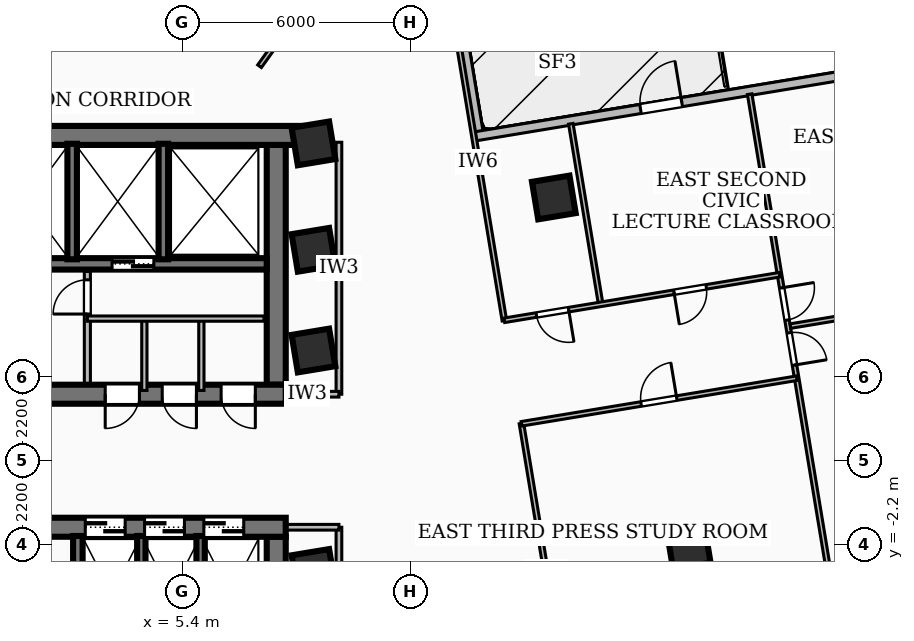
"""IFC4 building model, lengths in metres.
Left out: names, types, materials, properties, quantities, classifications, styles, units other than length and angle.
Written with IfcOpenShell. Run it as: python <this file> out.ifc"""

import sys

from ifc_helpers import new_model, si_unit, direction, frame, frame_2d, origin, origin_2d, place, context, subcontext, project, spatial, rectangle, extrude, element, fill, save


model = new_model("IFC4")
c1 = context("Model", 3, precision=1e-05, world=origin(), true_north=direction((0.0, 1.0)))
c2 = subcontext(c1, "Body", "Model", "MODEL_VIEW")
j1 = project(units=[si_unit("LENGTHUNIT", "METRE"), si_unit("PLANEANGLEUNIT", "RADIAN")], contexts=[c1])
p1 = place(None, origin())
s1 = spatial("IfcSite", under=j1, at=p1, CompositionType="ELEMENT")
p2 = place(p1, origin())
s2 = spatial("IfcBuilding", under=s1, at=p2, CompositionType="ELEMENT")
p3 = place(p2, frame((0.0, 0.0, 96.48)))
s3 = spatial("IfcBuildingStorey", under=s2, at=p3, CompositionType="ELEMENT", Elevation=96.48)
p4 = place(p3, frame((-8.78, 8.56, 0.0), z_axis=(0.0, 0.0, 1.0), x_axis=(1.0, 0.0, 0.0)))
e1 = element("IfcWall", 1, at=p4, inside=s3, PredefinedType="SHEAR", context=c2, shape_type="SweptSolid", body=[
    extrude(rectangle(XDim=17.56, YDim=0.5, at=frame_2d((8.78, 0.0))), origin(), (0.0, 0.0, 1.0), 3.34),
])
p5 = place(p3, frame((8.12, 1.75, 0.0), z_axis=(0.0, 0.0, 1.0), x_axis=(-1.0, 0.0, 0.0)))
e2 = element("IfcWall", 2, at=p5, inside=s3, PredefinedType="SHEAR", context=c2, shape_type="SweptSolid", body=[
    extrude(rectangle(XDim=16.24, YDim=0.5, at=frame_2d((8.12, 0.0))), origin(), (0.0, 0.0, 1.0), 3.34),
])
p6 = place(p5, frame((7.45, 0.0, 0.0)))
e3 = element("IfcOpeningElement", 3, at=p6, cuts=e2, PredefinedType="OPENING", context=c2, shape_type="SweptSolid", body=[
    extrude(rectangle(XDim=1.0, YDim=2.1, at=frame_2d((0.5, 1.05))), frame((0.0, 0.26, 0.0), z_axis=(0.0, -1.0, 0.0), x_axis=(1.0, 0.0, 0.0)), (0.0, 0.0, 1.0), 0.52),
])
p7 = place(p5, frame((3.85, 0.0, 0.0)))
e4 = element("IfcOpeningElement", 4, at=p7, cuts=e2, PredefinedType="OPENING", context=c2, shape_type="SweptSolid", body=[
    extrude(rectangle(XDim=0.9, YDim=2.06, at=frame_2d((0.45, 1.03))), frame((0.0, 0.26, 0.0), z_axis=(0.0, -1.0, 0.0), x_axis=(1.0, 0.0, 0.0)), (0.0, 0.0, 1.0), 0.52),
])
p8 = place(p5, frame((2.35, 0.0, 0.0)))
e5 = element("IfcOpeningElement", 5, at=p8, cuts=e2, PredefinedType="OPENING", context=c2, shape_type="SweptSolid", body=[
    extrude(rectangle(XDim=0.9, YDim=2.06, at=frame_2d((0.45, 1.03))), frame((0.0, 0.26, 0.0), z_axis=(0.0, -1.0, 0.0), x_axis=(1.0, 0.0, 0.0)), (0.0, 0.0, 1.0), 0.52),
])
p9 = place(p5, frame((0.8, 0.0, 0.0)))
e6 = element("IfcOpeningElement", 6, at=p9, cuts=e2, PredefinedType="OPENING", context=c2, shape_type="SweptSolid", body=[
    extrude(rectangle(XDim=0.9, YDim=2.06, at=frame_2d((0.45, 1.03))), frame((0.0, 0.26, 0.0), z_axis=(0.0, -1.0, 0.0), x_axis=(1.0, 0.0, 0.0)), (0.0, 0.0, 1.0), 0.52),
])
p10 = place(p3, frame((7.87, 8.31, 0.0), z_axis=(0.0, 0.0, 1.0), x_axis=(0.0, -1.0, 0.0)))
e7 = element("IfcWall", 7, at=p10, inside=s3, PredefinedType="SHEAR", context=c2, shape_type="SweptSolid", body=[
    extrude(rectangle(XDim=6.31, YDim=0.5, at=frame_2d((3.155, 0.0))), origin(), (0.0, 0.0, 1.0), 3.34),
])
p11 = place(p3, frame((7.62, 5.18, 0.0), z_axis=(0.0, 0.0, 1.0), x_axis=(-1.0, 0.0, 0.0)))
e8 = element("IfcWall", 8, at=p11, inside=s3, PredefinedType="SOLIDWALL", context=c2, shape_type="SweptSolid", body=[
    extrude(rectangle(XDim=15.24, YDim=0.3, at=frame_2d((7.62, 0.0))), origin(), (0.0, 0.0, 1.0), 3.34),
])
p12 = place(p11, frame((5.77, 0.0, 0.0)))
e9 = element("IfcOpeningElement", 9, at=p12, cuts=e8, PredefinedType="OPENING", context=c2, shape_type="SweptSolid", body=[
    extrude(rectangle(XDim=1.1, YDim=2.15, at=frame_2d((0.55, 1.075))), frame((0.0, 0.16, 0.0), z_axis=(0.0, -1.0, 0.0), x_axis=(1.0, 0.0, 0.0)), (0.0, 0.0, 1.0), 0.32),
])
p13 = place(p11, frame((2.97, 0.0, 0.0)))
e10 = element("IfcOpeningElement", 10, at=p13, cuts=e8, PredefinedType="OPENING", context=c2, shape_type="SweptSolid", body=[
    extrude(rectangle(XDim=1.1, YDim=2.15, at=frame_2d((0.55, 1.075))), frame((0.0, 0.16, 0.0), z_axis=(0.0, -1.0, 0.0), x_axis=(1.0, 0.0, 0.0)), (0.0, 0.0, 1.0), 0.32),
])
p14 = place(p11, frame((7.97, 0.0, 0.0)))
e11 = element("IfcOpeningElement", 11, at=p14, cuts=e8, PredefinedType="OPENING", context=c2, shape_type="SweptSolid", body=[
    extrude(rectangle(XDim=1.0, YDim=2.1, at=frame_2d((0.5, 1.05))), frame((0.0, 0.16, 0.0), z_axis=(0.0, -1.0, 0.0), x_axis=(1.0, 0.0, 0.0)), (0.0, 0.0, 1.0), 0.32),
])
p15 = place(p3, frame((-8.12, -1.75, 0.0), z_axis=(0.0, 0.0, 1.0), x_axis=(1.0, 0.0, 0.0)))
e12 = element("IfcWall", 12, at=p15, inside=s3, PredefinedType="SHEAR", context=c2, shape_type="SweptSolid", body=[
    extrude(rectangle(XDim=16.24, YDim=0.5, at=frame_2d((8.12, 0.0))), origin(), (0.0, 0.0, 1.0), 3.34),
])
p16 = place(p15, frame((7.45, 0.0, 0.0)))
e13 = element("IfcOpeningElement", 13, at=p16, cuts=e12, PredefinedType="OPENING", context=c2, shape_type="SweptSolid", body=[
    extrude(rectangle(XDim=1.0, YDim=2.1, at=frame_2d((0.5, 1.05))), frame((0.0, 0.26, 0.0), z_axis=(0.0, -1.0, 0.0), x_axis=(1.0, 0.0, 0.0)), (0.0, 0.0, 1.0), 0.52),
])
p17 = place(p15, frame((10.965, 0.0, 0.0)))
e14 = element("IfcOpeningElement", 14, at=p17, cuts=e12, PredefinedType="OPENING", context=c2, shape_type="SweptSolid", body=[
    extrude(rectangle(XDim=1.05, YDim=2.15, at=frame_2d((0.525, 1.075))), frame((0.0, 0.26, 0.0), z_axis=(0.0, -1.0, 0.0), x_axis=(1.0, 0.0, 0.0)), (0.0, 0.0, 1.0), 0.52),
])
p18 = place(p15, frame((12.525, 0.0, 0.0)))
e15 = element("IfcOpeningElement", 15, at=p18, cuts=e12, PredefinedType="OPENING", context=c2, shape_type="SweptSolid", body=[
    extrude(rectangle(XDim=1.05, YDim=2.15, at=frame_2d((0.525, 1.075))), frame((0.0, 0.26, 0.0), z_axis=(0.0, -1.0, 0.0), x_axis=(1.0, 0.0, 0.0)), (0.0, 0.0, 1.0), 0.52),
])
p19 = place(p15, frame((14.085, 0.0, 0.0)))
e16 = element("IfcOpeningElement", 16, at=p19, cuts=e12, PredefinedType="OPENING", context=c2, shape_type="SweptSolid", body=[
    extrude(rectangle(XDim=1.05, YDim=2.15, at=frame_2d((0.525, 1.075))), frame((0.0, 0.26, 0.0), z_axis=(0.0, -1.0, 0.0), x_axis=(1.0, 0.0, 0.0)), (0.0, 0.0, 1.0), 0.52),
])
p20 = place(p3, frame((7.87, -2.0, 0.0), z_axis=(0.0, 0.0, 1.0), x_axis=(0.0, -1.0, 0.0)))
e17 = element("IfcWall", 17, at=p20, inside=s3, PredefinedType="SHEAR", context=c2, shape_type="SweptSolid", body=[
    extrude(rectangle(XDim=6.31, YDim=0.5, at=frame_2d((3.155, 0.0))), origin(), (0.0, 0.0, 1.0), 3.34),
])
for number, where, z_axis, x_axis in (
    (18, (2.5, 5.3, 0.0), (0.0, 0.0, 1.0), (0.0, 1.0, 0.0)),
    (19, (4.9, 5.3, 0.0), (0.0, 0.0, 1.0), (0.0, 1.0, 0.0)),
):
    element("IfcWall", number, at=place(p3, frame(where, z_axis=z_axis, x_axis=x_axis)), inside=s3, PredefinedType="SOLIDWALL", context=c2, shape_type="SweptSolid", body=[
        extrude(rectangle(XDim=3.04, YDim=0.25, at=frame_2d((1.52, 0.0))), origin(), (0.0, 0.0, 1.0), 3.34),
    ])
p21 = place(p3, frame((2.65, -5.05, 0.0), z_axis=(0.0, 0.0, 1.0), x_axis=(0.0, 1.0, 0.0)))
e20 = element("IfcWall", 20, at=p21, inside=s3, PredefinedType="SOLIDWALL", context=c2, shape_type="SweptSolid", body=[
    extrude(rectangle(XDim=3.07, YDim=0.25, at=frame_2d((1.535, 0.0))), origin(), (0.0, 0.0, 1.0), 3.34),
])
for number, where, z_axis, x_axis in (
    (21, (4.32, -5.05, 0.0), (0.0, 0.0, 1.0), (0.0, 1.0, 0.0)),
    (22, (5.88, -5.05, 0.0), (0.0, 0.0, 1.0), (0.0, 1.0, 0.0)),
):
    element("IfcWall", number, at=place(p3, frame(where, z_axis=z_axis, x_axis=x_axis)), inside=s3, PredefinedType="SOLIDWALL", context=c2, shape_type="SweptSolid", body=[
        extrude(rectangle(XDim=3.07, YDim=0.22, at=frame_2d((1.535, 0.0))), origin(), (0.0, 0.0, 1.0), 3.34),
    ])
for number, where, z_axis, x_axis in (
    (23, (8.85, -2.9, 0.0), (0.0, 0.0, 1.0), (0.987, 0.163, 0.0)),
    (24, (8.85, 2.9, 0.0), (0.0, 0.0, 1.0), (0.987, 0.163, 0.0)),
    (25, (8.85, 5.55, 0.0), (0.0, 0.0, 1.0), (0.987, 0.163, 0.0)),
    (26, (8.85, 8.35, 0.0), (0.0, 0.0, 1.0), (0.987, 0.163, 0.0)),
    (27, (18.724, -2.271, 0.0), (0.0, 0.0, 1.0), (0.987, 0.163, 0.0)),
    (28, (15.175, 6.927, 0.0), (0.0, 0.0, 1.0), (0.987, 0.163, 0.0)),
):
    element("IfcColumn", number, at=place(p3, frame(where, z_axis=z_axis, x_axis=x_axis)), inside=s3, PredefinedType="COLUMN", context=c2, shape_type="SweptSolid", body=[
        extrude(rectangle(XDim=1.0, YDim=1.0, at=origin_2d()), origin(), (0.0, 0.0, 1.0), 3.6),
    ])
p22 = place(p3, frame((12.12, 15.142, 0.0), z_axis=(0.0, 0.0, 1.0), x_axis=(0.163241835244, -0.986586085056, 0.0)))
e29 = element("IfcWall", 29, at=p22, inside=s3, PredefinedType="SOLIDWALL", context=c2, shape_type="SweptSolid", body=[
    extrude(rectangle(XDim=6.775, YDim=0.24, at=frame_2d((3.387, 0.0))), origin(), (0.0, 0.0, 1.0), 3.34),
])
p23 = place(p3, frame((13.115, 8.537, 0.0), z_axis=(0.0, 0.0, 1.0), x_axis=(0.986576548161, 0.163299463007, 0.0)))
e30 = element("IfcWall", 30, at=p23, inside=s3, PredefinedType="SOLIDWALL", context=c2, shape_type="SweptSolid", body=[
    extrude(rectangle(XDim=16.277, YDim=0.24, at=frame_2d((8.138, 0.0))), origin(), (0.0, 0.0, 1.0), 3.34),
])
p24 = place(p23, frame((4.4, 0.0, 0.0)))
e31 = element("IfcOpeningElement", 31, at=p24, cuts=e30, PredefinedType="OPENING", context=c2, shape_type="SweptSolid", body=[
    extrude(rectangle(XDim=1.1, YDim=2.1, at=frame_2d((0.55, 1.05))), frame((0.0, 0.13, 0.0), z_axis=(0.0, -1.0, 0.0), x_axis=(1.0, 0.0, 0.0)), (0.0, 0.0, 1.0), 0.26),
])
p25 = place(p3, frame((31.312, -1.729, 0.0), z_axis=(0.0, 0.0, 1.0), x_axis=(-0.986572947557, -0.163321214629, 0.0)))
e32 = element("IfcWall", 32, at=p25, inside=s3, PredefinedType="SOLIDWALL", context=c2, shape_type="SweptSolid", body=[
    extrude(rectangle(XDim=16.274, YDim=0.24, at=frame_2d((8.137, 0.0))), origin(), (0.0, 0.0, 1.0), 3.34),
])
p26 = place(p25, frame((1.1, 0.0, 0.85)))
e33 = element("IfcOpeningElement", 33, at=p26, cuts=e32, PredefinedType="OPENING", context=c2, shape_type="SweptSolid", body=[
    extrude(rectangle(XDim=2.7, YDim=2.1, at=frame_2d((1.35, 1.05))), frame((0.0, 0.13, 0.0), z_axis=(0.0, -1.0, 0.0), x_axis=(1.0, 0.0, 0.0)), (0.0, 0.0, 1.0), 0.26),
])
p27 = place(p3, frame((2.9, 2.04, 0.0), z_axis=(0.0, 0.0, 1.0), x_axis=(0.0, 1.0, 0.0)))
e34 = element("IfcWall", 34, at=p27, inside=s3, PredefinedType="PARTITIONING", context=c2, shape_type="SweptSolid", body=[
    extrude(rectangle(XDim=2.94, YDim=0.16, at=frame_2d((1.47, 0.0))), origin(), (0.0, 0.0, 1.0), 2.405),
])
p28 = place(p27, frame((1.82, 0.0, 0.0)))
e35 = element("IfcOpeningElement", 35, at=p28, cuts=e34, PredefinedType="OPENING", context=c2, shape_type="SweptSolid", body=[
    extrude(rectangle(XDim=0.9, YDim=2.06, at=frame_2d((0.45, 1.03))), frame((0.0, 0.09, 0.0), z_axis=(0.0, -1.0, 0.0), x_axis=(1.0, 0.0, 0.0)), (0.0, 0.0, 1.0), 0.18),
])
p29 = place(p3, frame((2.9, 3.74, 0.0), z_axis=(0.0, 0.0, 1.0), x_axis=(1.0, 0.0, 0.0)))
e36 = element("IfcWall", 36, at=p29, inside=s3, PredefinedType="PARTITIONING", context=c2, shape_type="SweptSolid", body=[
    extrude(rectangle(XDim=4.65, YDim=0.138, at=frame_2d((2.325, 0.0))), origin(), (0.0, 0.0, 1.0), 3.34),
])
for number, where, z_axis, x_axis in (
    (37, (4.4, 1.85, 0.0), (0.0, 0.0, 1.0), (0.0, 1.0, 0.0)),
    (38, (5.9, 1.85, 0.0), (0.0, 0.0, 1.0), (0.0, 1.0, 0.0)),
):
    element("IfcWall", number, at=place(p3, frame(where, z_axis=z_axis, x_axis=x_axis)), inside=s3, PredefinedType="PARTITIONING", context=c2, shape_type="SweptSolid", body=[
        extrude(rectangle(XDim=1.89, YDim=0.138, at=frame_2d((0.945, 0.0))), origin(), (0.0, 0.0, 1.0), 2.405),
    ])
p30 = place(p3, frame((9.52, 1.75, 0.0), z_axis=(0.0, 0.0, 1.0), x_axis=(0.0, 1.0, 0.0)))
e39 = element("IfcWall", 39, at=p30, inside=s3, PredefinedType="PARTITIONING", context=c2, shape_type="SweptSolid", body=[
    extrude(rectangle(XDim=6.63, YDim=0.15, at=frame_2d((3.315, 0.0))), origin(), (0.0, 0.0, 1.0), 2.486),
])
p31 = place(p3, frame((7.85, 1.75, 0.0), z_axis=(0.0, 0.0, 1.0), x_axis=(1.0, 0.0, 0.0)))
e40 = element("IfcWall", 40, at=p31, inside=s3, PredefinedType="PARTITIONING", context=c2, shape_type="SweptSolid", body=[
    extrude(rectangle(XDim=1.67, YDim=0.15, at=frame_2d((0.835, 0.0))), origin(), (0.0, 0.0, 1.0), 2.405),
])
p32 = place(p3, frame((9.52, -8.38, 0.0), z_axis=(0.0, 0.0, 1.0), x_axis=(0.0, 1.0, 0.0)))
e41 = element("IfcWall", 41, at=p32, inside=s3, PredefinedType="PARTITIONING", context=c2, shape_type="SweptSolid", body=[
    extrude(rectangle(XDim=6.63, YDim=0.15, at=frame_2d((3.315, 0.0))), origin(), (0.0, 0.0, 1.0), 2.486),
])
p33 = place(p3, frame((7.85, -1.75, 0.0), z_axis=(0.0, 0.0, 1.0), x_axis=(1.0, 0.0, 0.0)))
e42 = element("IfcWall", 42, at=p33, inside=s3, PredefinedType="PARTITIONING", context=c2, shape_type="SweptSolid", body=[
    extrude(rectangle(XDim=1.67, YDim=0.15, at=frame_2d((0.835, 0.0))), origin(), (0.0, 0.0, 1.0), 2.405),
])
p34 = place(p3, frame((7.431, 10.38, 0.0), z_axis=(0.0, 0.0, 1.0), x_axis=(0.582126278944, 0.813098392178, 0.0)))
e43 = element("IfcWall", 43, at=p34, inside=s3, PredefinedType="PARTITIONING", context=c2, shape_type="SweptSolid", body=[
    extrude(rectangle(XDim=6.889, YDim=0.12, at=frame_2d((3.444, 0.0))), origin(), (0.0, 0.0, 1.0), 2.486),
])
p35 = place(p3, frame((13.874, 3.686, 0.0), z_axis=(0.0, 0.0, 1.0), x_axis=(-0.163270245909, 0.98658138377, 0.0)))
e44 = element("IfcWall", 44, at=p35, inside=s3, PredefinedType="PARTITIONING", context=c2, shape_type="SweptSolid", body=[
    extrude(rectangle(XDim=8.489, YDim=0.12, at=frame_2d((4.245, 0.0))), origin(), (0.0, 0.0, 1.0), 2.486),
])
p36 = place(p3, frame((15.62, -6.86, 0.0), z_axis=(0.0, 0.0, 1.0), x_axis=(-0.16330811288, 0.986575116384, 0.0)))
e45 = element("IfcWall", 45, at=p36, inside=s3, PredefinedType="PARTITIONING", context=c2, shape_type="SweptSolid", body=[
    extrude(rectangle(XDim=7.949, YDim=0.12, at=frame_2d((3.974, 0.0))), origin(), (0.0, 0.0, 1.0), 2.486),
])
p37 = place(p3, frame((16.405, 4.135, 0.0), z_axis=(0.0, 0.0, 1.0), x_axis=(-0.163276056047, 0.986580422227, 0.0)))
e46 = element("IfcWall", 46, at=p37, inside=s3, PredefinedType="PARTITIONING", context=c2, shape_type="SweptSolid", body=[
    extrude(rectangle(XDim=4.795, YDim=0.12, at=frame_2d((2.398, 0.0))), origin(), (0.0, 0.0, 1.0), 2.486),
])
p38 = place(p3, frame((21.114, 4.894, 0.0), z_axis=(0.0, 0.0, 1.0), x_axis=(-0.986566884893, -0.163357833093, 0.0)))
e47 = element("IfcWall", 47, at=p38, inside=s3, PredefinedType="PARTITIONING", context=c2, shape_type="SweptSolid", body=[
    extrude(rectangle(XDim=7.34, YDim=0.12, at=frame_2d((3.67, 0.0))), origin(), (0.0, 0.0, 1.0), 3.34),
])
p39 = place(p38, frame((5.625, 0.0, 0.0)))
e48 = element("IfcOpeningElement", 48, at=p39, cuts=e47, PredefinedType="OPENING", context=c2, shape_type="SweptSolid", body=[
    extrude(rectangle(XDim=0.86, YDim=2.04, at=frame_2d((0.43, 1.02))), frame((0.0, 0.07, 0.0), z_axis=(0.0, -1.0, 0.0), x_axis=(1.0, 0.0, 0.0)), (0.0, 0.0, 1.0), 0.14),
])
p40 = place(p38, frame((1.955, 0.0, 0.0)))
e49 = element("IfcOpeningElement", 49, at=p40, cuts=e47, PredefinedType="OPENING", context=c2, shape_type="SweptSolid", body=[
    extrude(rectangle(XDim=0.86, YDim=2.04, at=frame_2d((0.43, 1.02))), frame((0.0, 0.07, 0.0), z_axis=(0.0, -1.0, 0.0), x_axis=(1.0, 0.0, 0.0)), (0.0, 0.0, 1.0), 0.14),
])
p41 = place(p3, frame((14.324, 0.972, 0.0), z_axis=(0.0, 0.0, 1.0), x_axis=(0.986566884893, 0.163357833093, 0.0)))
e50 = element("IfcWall", 50, at=p41, inside=s3, PredefinedType="PARTITIONING", context=c2, shape_type="SweptSolid", body=[
    extrude(rectangle(XDim=7.34, YDim=0.12, at=frame_2d((3.67, 0.0))), origin(), (0.0, 0.0, 1.0), 3.34),
])
p42 = place(p41, frame((3.19, 0.0, 0.0)))
e51 = element("IfcOpeningElement", 51, at=p42, cuts=e50, PredefinedType="OPENING", context=c2, shape_type="SweptSolid", body=[
    extrude(rectangle(XDim=0.95, YDim=2.08, at=frame_2d((0.475, 1.04))), frame((0.0, 0.07, 0.0), z_axis=(0.0, -1.0, 0.0), x_axis=(1.0, 0.0, 0.0)), (0.0, 0.0, 1.0), 0.14),
])
p43 = place(p3, frame((21.399, 3.543, 0.0), z_axis=(0.0, 0.0, 1.0), x_axis=(0.986570089658, 0.16333847738, 0.0)))
e52 = element("IfcWall", 52, at=p43, inside=s3, PredefinedType="PARTITIONING", context=c2, shape_type="SweptSolid", body=[
    extrude(rectangle(XDim=10.304, YDim=0.12, at=frame_2d((5.152, 0.0))), origin(), (0.0, 0.0, 1.0), 2.832),
])
p44 = place(p3, frame((20.328, 9.645, 0.0), z_axis=(0.0, 0.0, 1.0), x_axis=(0.163336472865, -0.986570421527, 0.0)))
e53 = element("IfcWall", 53, at=p44, inside=s3, PredefinedType="PARTITIONING", context=c2, shape_type="SweptSolid", body=[
    extrude(rectangle(XDim=12.931, YDim=0.12, at=frame_2d((6.465, 0.0))), origin(), (0.0, 0.0, 1.0), 2.486),
])
p45 = place(p44, frame((6.365, 0.0, 0.0)))
e54 = element("IfcOpeningElement", 54, at=p45, cuts=e53, PredefinedType="OPENING", context=c2, shape_type="SweptSolid", body=[
    extrude(rectangle(XDim=0.86, YDim=2.04, at=frame_2d((0.43, 1.02))), frame((0.0, 0.07, 0.0), z_axis=(0.0, -1.0, 0.0), x_axis=(1.0, 0.0, 0.0)), (0.0, 0.0, 1.0), 0.14),
])
p46 = place(p44, frame((5.165, 0.0, 0.0)))
e55 = element("IfcOpeningElement", 55, at=p46, cuts=e53, PredefinedType="OPENING", context=c2, shape_type="SweptSolid", body=[
    extrude(rectangle(XDim=0.86, YDim=2.04, at=frame_2d((0.43, 1.02))), frame((0.0, 0.07, 0.0), z_axis=(0.0, -1.0, 0.0), x_axis=(1.0, 0.0, 0.0)), (0.0, 0.0, 1.0), 0.14),
])
p47 = place(p24, origin())
e56 = element("IfcDoor", 56, at=p47, inside=s3, OperationType="SINGLE_SWING_RIGHT", PredefinedType="DOOR", context=c2, shape_type="SweptSolid", body=[
    extrude(rectangle(XDim=1.1, YDim=2.1, at=frame_2d((0.55, 1.05))), frame((0.0, 0.025, 0.0), z_axis=(0.0, -1.0, 0.0), x_axis=(1.0, 0.0, 0.0)), (0.0, 0.0, 1.0), 0.05),
])
fill(e31, e56)
p48 = place(p13, origin())
e57 = element("IfcDoor", 57, at=p48, inside=s3, OperationType="DOUBLE_DOOR_SLIDING", PredefinedType="DOOR", context=c2, shape_type="SweptSolid", body=[
    extrude(rectangle(XDim=1.1, YDim=2.15, at=frame_2d((0.55, 1.075))), frame((0.0, 0.025, 0.0), z_axis=(0.0, -1.0, 0.0), x_axis=(1.0, 0.0, 0.0)), (0.0, 0.0, 1.0), 0.05),
])
fill(e10, e57)
p49 = place(p17, origin())
e58 = element("IfcDoor", 58, at=p49, inside=s3, OperationType="DOUBLE_DOOR_SLIDING", PredefinedType="DOOR", context=c2, shape_type="SweptSolid", body=[
    extrude(rectangle(XDim=1.05, YDim=2.15, at=frame_2d((0.525, 1.075))), frame((0.0, 0.025, 0.0), z_axis=(0.0, -1.0, 0.0), x_axis=(1.0, 0.0, 0.0)), (0.0, 0.0, 1.0), 0.05),
])
fill(e14, e58)
p50 = place(p18, origin())
e59 = element("IfcDoor", 59, at=p50, inside=s3, OperationType="DOUBLE_DOOR_SLIDING", PredefinedType="DOOR", context=c2, shape_type="SweptSolid", body=[
    extrude(rectangle(XDim=1.05, YDim=2.15, at=frame_2d((0.525, 1.075))), frame((0.0, 0.025, 0.0), z_axis=(0.0, -1.0, 0.0), x_axis=(1.0, 0.0, 0.0)), (0.0, 0.0, 1.0), 0.05),
])
fill(e15, e59)
p51 = place(p19, origin())
e60 = element("IfcDoor", 60, at=p51, inside=s3, OperationType="DOUBLE_DOOR_SLIDING", PredefinedType="DOOR", context=c2, shape_type="SweptSolid", body=[
    extrude(rectangle(XDim=1.05, YDim=2.15, at=frame_2d((0.525, 1.075))), frame((0.0, 0.025, 0.0), z_axis=(0.0, -1.0, 0.0), x_axis=(1.0, 0.0, 0.0)), (0.0, 0.0, 1.0), 0.05),
])
fill(e16, e60)
p52 = place(p7, origin())
e61 = element("IfcDoor", 61, at=p52, inside=s3, OperationType="SINGLE_SWING_RIGHT", PredefinedType="DOOR", context=c2, shape_type="SweptSolid", body=[
    extrude(rectangle(XDim=0.9, YDim=2.06, at=frame_2d((0.45, 1.03))), frame((0.0, 0.025, 0.0), z_axis=(0.0, -1.0, 0.0), x_axis=(1.0, 0.0, 0.0)), (0.0, 0.0, 1.0), 0.05),
])
fill(e4, e61)
p53 = place(p8, origin())
e62 = element("IfcDoor", 62, at=p53, inside=s3, OperationType="SINGLE_SWING_LEFT", PredefinedType="DOOR", context=c2, shape_type="SweptSolid", body=[
    extrude(rectangle(XDim=0.9, YDim=2.06, at=frame_2d((0.45, 1.03))), frame((0.0, 0.025, 0.0), z_axis=(0.0, -1.0, 0.0), x_axis=(1.0, 0.0, 0.0)), (0.0, 0.0, 1.0), 0.05),
])
fill(e5, e62)
p54 = place(p9, origin())
e63 = element("IfcDoor", 63, at=p54, inside=s3, OperationType="SINGLE_SWING_LEFT", PredefinedType="DOOR", context=c2, shape_type="SweptSolid", body=[
    extrude(rectangle(XDim=0.9, YDim=2.06, at=frame_2d((0.45, 1.03))), frame((0.0, 0.025, 0.0), z_axis=(0.0, -1.0, 0.0), x_axis=(1.0, 0.0, 0.0)), (0.0, 0.0, 1.0), 0.05),
])
fill(e6, e63)
p55 = place(p28, origin())
e64 = element("IfcDoor", 64, at=p55, inside=s3, OperationType="SINGLE_SWING_LEFT", PredefinedType="DOOR", context=c2, shape_type="SweptSolid", body=[
    extrude(rectangle(XDim=0.9, YDim=2.06, at=frame_2d((0.45, 1.03))), frame((0.0, 0.025, 0.0), z_axis=(0.0, -1.0, 0.0), x_axis=(1.0, 0.0, 0.0)), (0.0, 0.0, 1.0), 0.05),
])
fill(e35, e64)
p56 = place(p39, origin())
e65 = element("IfcDoor", 65, at=p56, inside=s3, OperationType="SINGLE_SWING_LEFT", PredefinedType="DOOR", context=c2, shape_type="SweptSolid", body=[
    extrude(rectangle(XDim=0.86, YDim=2.04, at=frame_2d((0.43, 1.02))), frame((0.0, 0.025, 0.0), z_axis=(0.0, -1.0, 0.0), x_axis=(1.0, 0.0, 0.0)), (0.0, 0.0, 1.0), 0.05),
])
fill(e48, e65)
p57 = place(p40, origin())
e66 = element("IfcDoor", 66, at=p57, inside=s3, OperationType="SINGLE_SWING_RIGHT", PredefinedType="DOOR", context=c2, shape_type="SweptSolid", body=[
    extrude(rectangle(XDim=0.86, YDim=2.04, at=frame_2d((0.43, 1.02))), frame((0.0, 0.025, 0.0), z_axis=(0.0, -1.0, 0.0), x_axis=(1.0, 0.0, 0.0)), (0.0, 0.0, 1.0), 0.05),
])
fill(e49, e66)
p58 = place(p42, origin())
e67 = element("IfcDoor", 67, at=p58, inside=s3, OperationType="SINGLE_SWING_RIGHT", PredefinedType="DOOR", context=c2, shape_type="SweptSolid", body=[
    extrude(rectangle(XDim=0.95, YDim=2.08, at=frame_2d((0.475, 1.04))), frame((0.0, 0.025, 0.0), z_axis=(0.0, -1.0, 0.0), x_axis=(1.0, 0.0, 0.0)), (0.0, 0.0, 1.0), 0.05),
])
fill(e51, e67)
p59 = place(p45, origin())
e68 = element("IfcDoor", 68, at=p59, inside=s3, OperationType="SINGLE_SWING_RIGHT", PredefinedType="DOOR", context=c2, shape_type="SweptSolid", body=[
    extrude(rectangle(XDim=0.86, YDim=2.04, at=frame_2d((0.43, 1.02))), frame((0.0, 0.025, 0.0), z_axis=(0.0, -1.0, 0.0), x_axis=(1.0, 0.0, 0.0)), (0.0, 0.0, 1.0), 0.05),
])
fill(e54, e68)
p60 = place(p46, origin())
e69 = element("IfcDoor", 69, at=p60, inside=s3, OperationType="SINGLE_SWING_LEFT", PredefinedType="DOOR", context=c2, shape_type="SweptSolid", body=[
    extrude(rectangle(XDim=0.86, YDim=2.04, at=frame_2d((0.43, 1.02))), frame((0.0, 0.025, 0.0), z_axis=(0.0, -1.0, 0.0), x_axis=(1.0, 0.0, 0.0)), (0.0, 0.0, 1.0), 0.05),
])
fill(e55, e69)
save(model, sys.argv[1])
